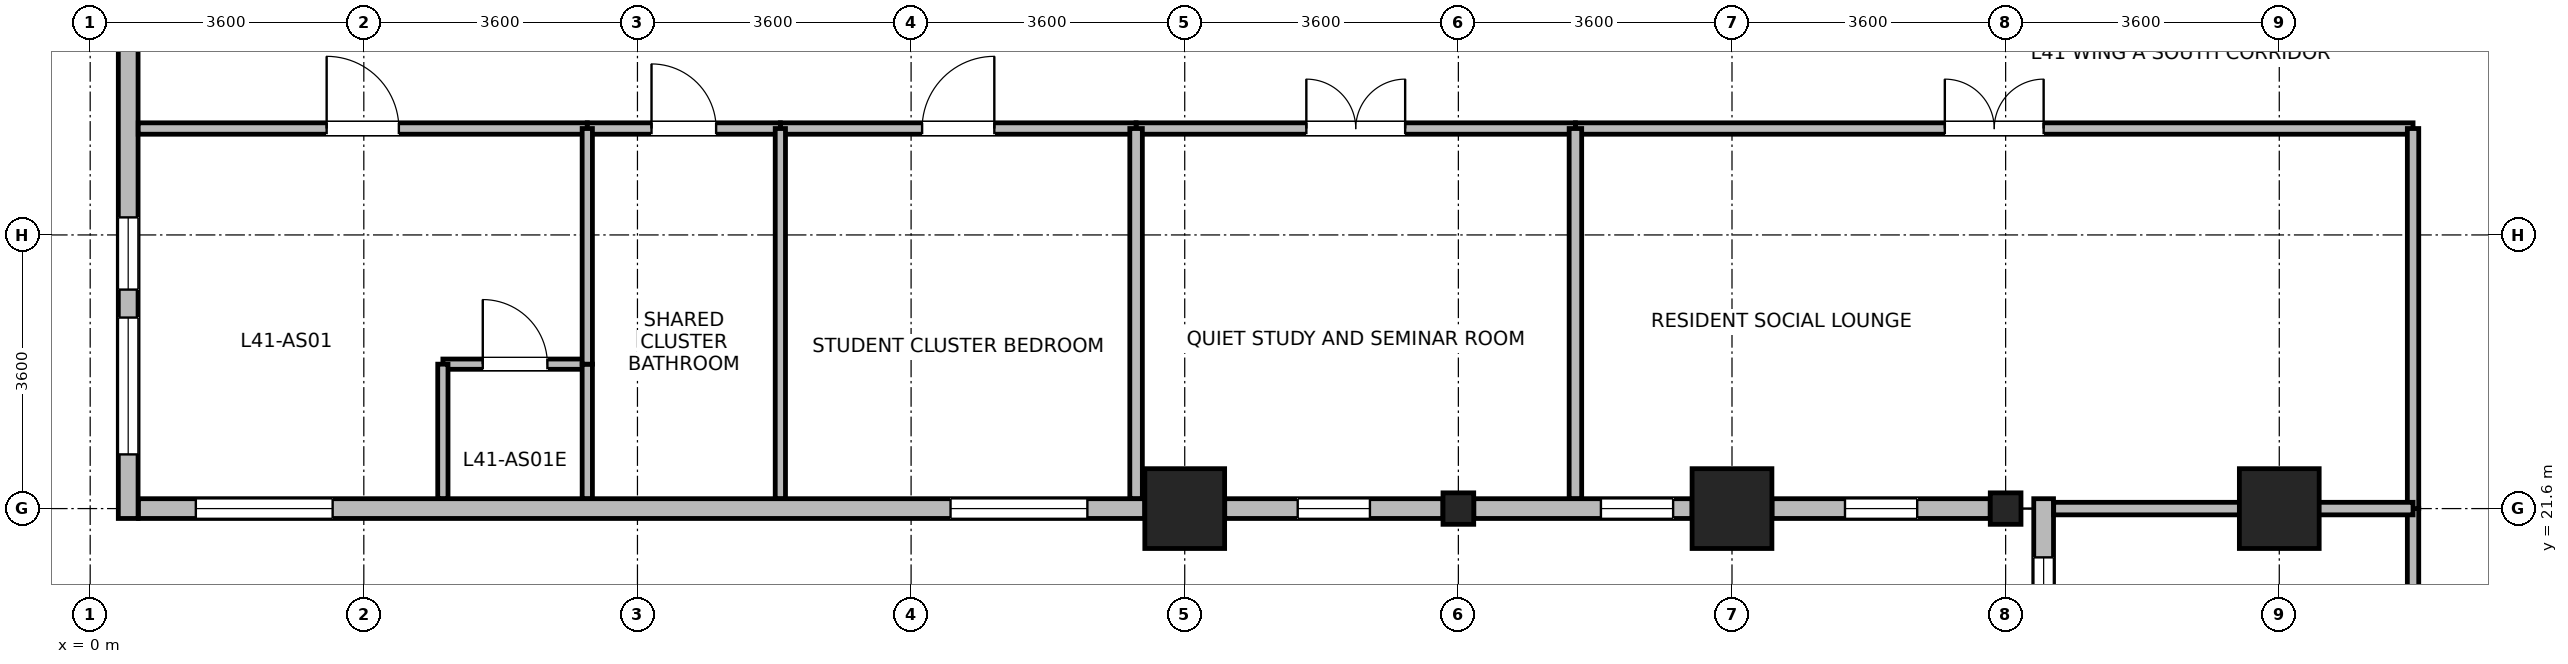
"""IFC4 building model, lengths in metres.
Left out: names, types, materials, properties, quantities, classifications, styles, units other than length and angle.
Written with IfcOpenShell. Run it as: python <this file> out.ifc"""

import sys

from ifc_helpers import new_model, si_unit, direction, frame, frame_2d, origin, origin_2d, place, context, subcontext, project, spatial, rectangle, i_section, extrude, source, transform, mapped, element, fill, save


model = new_model("IFC4")
c1 = context("Model", 3, precision=1e-05, world=origin(), true_north=direction((0.0, 1.0)))
c2 = subcontext(c1, "Body", "Model", "MODEL_VIEW")
j1 = project(units=[si_unit("LENGTHUNIT", "METRE"), si_unit("PLANEANGLEUNIT", "RADIAN")], contexts=[c1])
p1 = place(None, origin())
s1 = spatial("IfcSite", under=j1, at=p1, CompositionType="ELEMENT")
p2 = place(p1, origin())
s2 = spatial("IfcBuilding", under=s1, at=p2, CompositionType="ELEMENT")
p3 = place(p2, frame((0.0, 0.0, 162.4)))
s3 = spatial("IfcBuildingStorey", under=s2, at=p3, CompositionType="ELEMENT", Elevation=162.4)
m1 = source(origin(), c2, "Body", "SweptSolid", [
    extrude(rectangle(XDim=1.05, YDim=1.05, at=origin_2d()), origin(), (0.0, 0.0, 1.0), 3.7),
])
for number, where, z_axis, x_axis in (
    (1, (14.4, 21.6, 0.0), (0.0, 0.0, 1.0), (1.0, 0.0, 0.0)),
    (2, (21.6, 21.6, 0.0), (0.0, 0.0, 1.0), (1.0, 0.0, 0.0)),
    (3, (28.8, 21.6, 0.0), (0.0, 0.0, 1.0), (1.0, 0.0, 0.0)),
):
    element("IfcColumn", number, at=place(p3, frame(where, z_axis=z_axis, x_axis=x_axis)), inside=s3, PredefinedType="COLUMN", context=c2, shape_type="MappedRepresentation", body=[
        mapped(m1, transform((0.0, 0.0, 0.0), x_axis=(1.0, 0.0, 0.0), y_axis=(0.0, 1.0, 0.0), z_axis=(0.0, 0.0, 1.0), scale=1.0)),
    ])
m2 = source(origin(), c2, "Body", "SweptSolid", [
    extrude(i_section(OverallWidth=0.404, OverallDepth=0.414, WebThickness=0.021, FlangeThickness=0.028, FilletRadius=0.015, at=origin_2d()), origin(), (0.0, 0.0, 1.0), 3.7),
])
for number, where, z_axis, x_axis in (
    (4, (18.0, 21.6, 0.0), (0.0, 0.0, 1.0), (1.0, 0.0, 0.0)),
    (5, (25.2, 21.6, 0.0), (0.0, 0.0, 1.0), (1.0, 0.0, 0.0)),
):
    element("IfcColumn", number, at=place(p3, frame(where, z_axis=z_axis, x_axis=x_axis)), inside=s3, PredefinedType="COLUMN", context=c2, shape_type="MappedRepresentation", body=[
        mapped(m2, transform((0.0, 0.0, 0.0), x_axis=(1.0, 0.0, 0.0), y_axis=(0.0, 1.0, 0.0), z_axis=(0.0, 0.0, 1.0), scale=1.0)),
    ])
p4 = place(p3, frame((0.5, 21.47, 0.0), z_axis=(0.0, 0.0, 1.0), x_axis=(0.0, 1.0, 0.0)))
e6 = element("IfcWall", 6, at=p4, inside=s3, PredefinedType="STANDARD", context=c2, shape_type="SweptSolid", body=[
    extrude(rectangle(XDim=6.972, YDim=0.26, at=frame_2d((3.486, 0.0))), origin(), (0.0, 0.0, 1.0), 3.44),
])
p5 = place(p4, frame((0.843, 0.0, 0.85)))
e7 = element("IfcOpeningElement", 7, at=p5, cuts=e6, PredefinedType="OPENING", context=c2, shape_type="SweptSolid", body=[
    extrude(rectangle(XDim=1.8, YDim=1.85, at=frame_2d((0.9, 0.925))), frame((0.0, 0.14, 0.0), z_axis=(0.0, -1.0, 0.0), x_axis=(1.0, 0.0, 0.0)), (0.0, 0.0, 1.0), 0.28),
])
p6 = place(p4, frame((3.011, 0.0, 0.85)))
e8 = element("IfcOpeningElement", 8, at=p6, cuts=e6, PredefinedType="OPENING", context=c2, shape_type="SweptSolid", body=[
    extrude(rectangle(XDim=0.95, YDim=1.75, at=frame_2d((0.475, 0.875))), frame((0.0, 0.14, 0.0), z_axis=(0.0, -1.0, 0.0), x_axis=(1.0, 0.0, 0.0)), (0.0, 0.0, 1.0), 0.28),
])
p7 = place(p3, frame((13.874, 21.6, 0.0), z_axis=(0.0, 0.0, 1.0), x_axis=(-1.0, 0.0, 0.0)))
e9 = element("IfcWall", 9, at=p7, inside=s3, PredefinedType="STANDARD", context=c2, shape_type="SweptSolid", body=[
    extrude(rectangle(XDim=13.239, YDim=0.26, at=frame_2d((6.62, 0.0))), origin(), (0.0, 0.0, 1.0), 3.44),
])
p8 = place(p7, frame((0.755, 0.0, 0.85)))
e10 = element("IfcOpeningElement", 10, at=p8, cuts=e9, PredefinedType="OPENING", context=c2, shape_type="SweptSolid", body=[
    extrude(rectangle(XDim=1.8, YDim=1.85, at=frame_2d((0.9, 0.925))), frame((0.0, 0.14, 0.0), z_axis=(0.0, -1.0, 0.0), x_axis=(1.0, 0.0, 0.0)), (0.0, 0.0, 1.0), 0.28),
])
p9 = place(p7, frame((10.684, 0.0, 0.85)))
e11 = element("IfcOpeningElement", 11, at=p9, cuts=e9, PredefinedType="OPENING", context=c2, shape_type="SweptSolid", body=[
    extrude(rectangle(XDim=1.8, YDim=1.85, at=frame_2d((0.9, 0.925))), frame((0.0, 0.14, 0.0), z_axis=(0.0, -1.0, 0.0), x_axis=(1.0, 0.0, 0.0)), (0.0, 0.0, 1.0), 0.28),
])
p10 = place(p3, frame((17.797, 21.6, 0.0), z_axis=(0.0, 0.0, 1.0), x_axis=(-1.0, 0.0, 0.0)))
e12 = element("IfcWall", 12, at=p10, inside=s3, PredefinedType="STANDARD", context=c2, shape_type="SweptSolid", body=[
    extrude(rectangle(XDim=2.871, YDim=0.26, at=frame_2d((1.436, 0.0))), origin(), (0.0, 0.0, 1.0), 2.99),
])
p11 = place(p10, frame((0.96, 0.0, 0.85)))
e13 = element("IfcOpeningElement", 13, at=p11, cuts=e12, PredefinedType="OPENING", context=c2, shape_type="SweptSolid", body=[
    extrude(rectangle(XDim=0.95, YDim=1.75, at=frame_2d((0.475, 0.875))), frame((0.0, 0.14, 0.0), z_axis=(0.0, -1.0, 0.0), x_axis=(1.0, 0.0, 0.0)), (0.0, 0.0, 1.0), 0.28),
])
p12 = place(p3, frame((21.074, 21.6, 0.0), z_axis=(0.0, 0.0, 1.0), x_axis=(-1.0, 0.0, 0.0)))
e14 = element("IfcWall", 14, at=p12, inside=s3, PredefinedType="STANDARD", context=c2, shape_type="SweptSolid", body=[
    extrude(rectangle(XDim=2.871, YDim=0.26, at=frame_2d((1.436, 0.0))), origin(), (0.0, 0.0, 1.0), 2.99),
])
p13 = place(p12, frame((0.249, 0.0, 0.85)))
e15 = element("IfcOpeningElement", 15, at=p13, cuts=e14, PredefinedType="OPENING", context=c2, shape_type="SweptSolid", body=[
    extrude(rectangle(XDim=0.95, YDim=1.75, at=frame_2d((0.475, 0.875))), frame((0.0, 0.14, 0.0), z_axis=(0.0, -1.0, 0.0), x_axis=(1.0, 0.0, 0.0)), (0.0, 0.0, 1.0), 0.28),
])
p14 = place(p3, frame((24.997, 21.6, 0.0), z_axis=(0.0, 0.0, 1.0), x_axis=(-1.0, 0.0, 0.0)))
e16 = element("IfcWall", 16, at=p14, inside=s3, PredefinedType="STANDARD", context=c2, shape_type="SweptSolid", body=[
    extrude(rectangle(XDim=2.871, YDim=0.26, at=frame_2d((1.436, 0.0))), origin(), (0.0, 0.0, 1.0), 2.99),
])
p15 = place(p14, frame((0.96, 0.0, 0.85)))
e17 = element("IfcOpeningElement", 17, at=p15, cuts=e16, PredefinedType="OPENING", context=c2, shape_type="SweptSolid", body=[
    extrude(rectangle(XDim=0.95, YDim=1.75, at=frame_2d((0.475, 0.875))), frame((0.0, 0.14, 0.0), z_axis=(0.0, -1.0, 0.0), x_axis=(1.0, 0.0, 0.0)), (0.0, 0.0, 1.0), 0.28),
])
p16 = place(p3, frame((25.7, 1.67, 0.0), z_axis=(0.0, 0.0, 1.0), x_axis=(0.0, 1.0, 0.0)))
e18 = element("IfcWall", 18, at=p16, inside=s3, PredefinedType="STANDARD", context=c2, shape_type="SweptSolid", body=[
    extrude(rectangle(XDim=20.06, YDim=0.26, at=frame_2d((10.03, 0.0))), origin(), (0.0, 0.0, 1.0), 3.44),
])
p17 = place(p16, frame((0.772, 0.0, 0.85)))
e19 = element("IfcOpeningElement", 19, at=p17, cuts=e18, PredefinedType="OPENING", context=c2, shape_type="SweptSolid", body=[
    extrude(rectangle(XDim=1.8, YDim=1.85, at=frame_2d((0.9, 0.925))), frame((0.0, 0.14, 0.0), z_axis=(0.0, -1.0, 0.0), x_axis=(1.0, 0.0, 0.0)), (0.0, 0.0, 1.0), 0.28),
])
p18 = place(p16, frame((7.458, 0.0, 0.85)))
e20 = element("IfcOpeningElement", 20, at=p18, cuts=e18, PredefinedType="OPENING", context=c2, shape_type="SweptSolid", body=[
    extrude(rectangle(XDim=1.8, YDim=1.85, at=frame_2d((0.9, 0.925))), frame((0.0, 0.14, 0.0), z_axis=(0.0, -1.0, 0.0), x_axis=(1.0, 0.0, 0.0)), (0.0, 0.0, 1.0), 0.28),
])
p19 = place(p16, frame((14.145, 0.0, 0.85)))
e21 = element("IfcOpeningElement", 21, at=p19, cuts=e18, PredefinedType="OPENING", context=c2, shape_type="SweptSolid", body=[
    extrude(rectangle(XDim=1.8, YDim=1.85, at=frame_2d((0.9, 0.925))), frame((0.0, 0.14, 0.0), z_axis=(0.0, -1.0, 0.0), x_axis=(1.0, 0.0, 0.0)), (0.0, 0.0, 1.0), 0.28),
])
p20 = place(p16, frame((17.488, 0.0, 0.85)))
e22 = element("IfcOpeningElement", 22, at=p20, cuts=e18, PredefinedType="OPENING", context=c2, shape_type="SweptSolid", body=[
    extrude(rectangle(XDim=1.8, YDim=1.85, at=frame_2d((0.9, 0.925))), frame((0.0, 0.14, 0.0), z_axis=(0.0, -1.0, 0.0), x_axis=(1.0, 0.0, 0.0)), (0.0, 0.0, 1.0), 0.28),
])
p21 = place(p3, frame((4.64, 23.5, 0.0), z_axis=(0.0, 0.0, 1.0), x_axis=(1.0, 0.0, 0.0)))
e23 = element("IfcWall", 23, at=p21, inside=s3, PredefinedType="PARTITIONING", context=c2, shape_type="SweptSolid", body=[
    extrude(rectangle(XDim=1.9, YDim=0.135, at=frame_2d((0.95, 0.0))), origin(), (0.0, 0.0, 1.0), 3.44),
])
p22 = place(p21, frame((0.525, 0.0, 0.0)))
e24 = element("IfcOpeningElement", 24, at=p22, cuts=e23, PredefinedType="OPENING", context=c2, shape_type="SweptSolid", body=[
    extrude(rectangle(XDim=0.85, YDim=2.04, at=frame_2d((0.425, 1.02))), frame((0.0, 0.078, 0.0), z_axis=(0.0, -1.0, 0.0), x_axis=(1.0, 0.0, 0.0)), (0.0, 0.0, 1.0), 0.155),
])
for number, where, z_axis, x_axis in (
    (25, (4.64, 21.732, 0.0), (0.0, 0.0, 1.0), (0.0, 1.0, 0.0)),
    (26, (6.54, 21.732, 0.0), (0.0, 0.0, 1.0), (0.0, 1.0, 0.0)),
):
    element("IfcWall", number, at=place(p3, frame(where, z_axis=z_axis, x_axis=x_axis)), inside=s3, PredefinedType="PARTITIONING", context=c2, shape_type="SweptSolid", body=[
        extrude(rectangle(XDim=1.768, YDim=0.135, at=frame_2d((0.884, 0.0))), origin(), (0.0, 0.0, 1.0), 3.44),
    ])
p23 = place(p3, frame((19.54, 26.6, 0.0), z_axis=(0.0, 0.0, 1.0), x_axis=(1.0, 0.0, 0.0)))
e27 = element("IfcWall", 27, at=p23, inside=s3, PredefinedType="PARTITIONING", context=c2, shape_type="SweptSolid", body=[
    extrude(rectangle(XDim=11.02, YDim=0.15, at=frame_2d((5.51, 0.0))), origin(), (0.0, 0.0, 1.0), 3.44),
])
p24 = place(p23, frame((4.86, 0.0, 0.0)))
e28 = element("IfcOpeningElement", 28, at=p24, cuts=e27, PredefinedType="OPENING", context=c2, shape_type="SweptSolid", body=[
    extrude(rectangle(XDim=1.3, YDim=2.12, at=frame_2d((0.65, 1.06))), frame((0.0, 0.085, 0.0), z_axis=(0.0, -1.0, 0.0), x_axis=(1.0, 0.0, 0.0)), (0.0, 0.0, 1.0), 0.17),
])
p25 = place(p3, frame((30.56, 14.5, 0.0), z_axis=(0.0, 0.0, 1.0), x_axis=(0.0, 1.0, 0.0)))
e29 = element("IfcWall", 29, at=p25, inside=s3, PredefinedType="PARTITIONING", context=c2, shape_type="SweptSolid", body=[
    extrude(rectangle(XDim=7.1, YDim=0.15, at=frame_2d((3.55, 0.0))), origin(), (0.0, 0.0, 1.0), 3.44),
])
p26 = place(p25, frame((2.9, 0.0, 0.0)))
e30 = element("IfcOpeningElement", 30, at=p26, cuts=e29, PredefinedType="OPENING", context=c2, shape_type="SweptSolid", body=[
    extrude(rectangle(XDim=1.3, YDim=2.12, at=frame_2d((0.65, 1.06))), frame((0.0, 0.085, 0.0), z_axis=(0.0, -1.0, 0.0), x_axis=(1.0, 0.0, 0.0)), (0.0, 0.0, 1.0), 0.17),
])
p27 = place(p3, frame((0.632, 26.6, 0.0), z_axis=(0.0, 0.0, 1.0), x_axis=(1.0, 0.0, 0.0)))
e31 = element("IfcWall", 31, at=p27, inside=s3, PredefinedType="PARTITIONING", context=c2, shape_type="SweptSolid", body=[
    extrude(rectangle(XDim=5.908, YDim=0.15, at=frame_2d((2.954, 0.0))), origin(), (0.0, 0.0, 1.0), 3.44),
])
p28 = place(p27, frame((2.479, 0.0, 0.0)))
e32 = element("IfcOpeningElement", 32, at=p28, cuts=e31, PredefinedType="OPENING", context=c2, shape_type="SweptSolid", body=[
    extrude(rectangle(XDim=0.95, YDim=2.1, at=frame_2d((0.475, 1.05))), frame((0.0, 0.085, 0.0), z_axis=(0.0, -1.0, 0.0), x_axis=(1.0, 0.0, 0.0)), (0.0, 0.0, 1.0), 0.17),
])
p29 = place(p3, frame((13.76, 26.6, 0.0), z_axis=(0.0, 0.0, 1.0), x_axis=(1.0, 0.0, 0.0)))
e33 = element("IfcWall", 33, at=p29, inside=s3, PredefinedType="PARTITIONING", context=c2, shape_type="SweptSolid", body=[
    extrude(rectangle(XDim=5.78, YDim=0.15, at=frame_2d((2.89, 0.0))), origin(), (0.0, 0.0, 1.0), 3.44),
])
p30 = place(p29, frame((2.24, 0.0, 0.0)))
e34 = element("IfcOpeningElement", 34, at=p30, cuts=e33, PredefinedType="OPENING", context=c2, shape_type="SweptSolid", body=[
    extrude(rectangle(XDim=1.3, YDim=2.12, at=frame_2d((0.65, 1.06))), frame((0.0, 0.085, 0.0), z_axis=(0.0, -1.0, 0.0), x_axis=(1.0, 0.0, 0.0)), (0.0, 0.0, 1.0), 0.17),
])
p31 = place(p3, frame((30.56, 21.6, 0.0), z_axis=(0.0, 0.0, 1.0), x_axis=(0.0, 1.0, 0.0)))
e35 = element("IfcWall", 35, at=p31, inside=s3, PredefinedType="PARTITIONING", context=c2, shape_type="SweptSolid", body=[
    extrude(rectangle(XDim=5.0, YDim=0.15, at=frame_2d((2.5, 0.0))), origin(), (0.0, 0.0, 1.0), 3.44),
])
p32 = place(p3, frame((9.08, 26.6, 0.0), z_axis=(0.0, 0.0, 1.0), x_axis=(1.0, 0.0, 0.0)))
e36 = element("IfcWall", 36, at=p32, inside=s3, PredefinedType="PARTITIONING", context=c2, shape_type="SweptSolid", body=[
    extrude(rectangle(XDim=4.68, YDim=0.15, at=frame_2d((2.34, 0.0))), origin(), (0.0, 0.0, 1.0), 3.44),
])
p33 = place(p32, frame((1.865, 0.0, 0.0)))
e37 = element("IfcOpeningElement", 37, at=p33, cuts=e36, PredefinedType="OPENING", context=c2, shape_type="SweptSolid", body=[
    extrude(rectangle(XDim=0.95, YDim=2.1, at=frame_2d((0.475, 1.05))), frame((0.0, 0.085, 0.0), z_axis=(0.0, -1.0, 0.0), x_axis=(1.0, 0.0, 0.0)), (0.0, 0.0, 1.0), 0.17),
])
p34 = place(p3, frame((6.54, 26.6, 0.0), z_axis=(0.0, 0.0, 1.0), x_axis=(1.0, 0.0, 0.0)))
e38 = element("IfcWall", 38, at=p34, inside=s3, PredefinedType="PARTITIONING", context=c2, shape_type="SweptSolid", body=[
    extrude(rectangle(XDim=2.54, YDim=0.15, at=frame_2d((1.27, 0.0))), origin(), (0.0, 0.0, 1.0), 3.44),
])
p35 = place(p34, frame((0.845, 0.0, 0.0)))
e39 = element("IfcOpeningElement", 39, at=p35, cuts=e38, PredefinedType="OPENING", context=c2, shape_type="SweptSolid", body=[
    extrude(rectangle(XDim=0.85, YDim=2.04, at=frame_2d((0.425, 1.02))), frame((0.0, 0.085, 0.0), z_axis=(0.0, -1.0, 0.0), x_axis=(1.0, 0.0, 0.0)), (0.0, 0.0, 1.0), 0.17),
])
p36 = place(p3, frame((9.08, 21.732, 0.0), z_axis=(0.0, 0.0, 1.0), x_axis=(0.0, 1.0, 0.0)))
e40 = element("IfcWall", 40, at=p36, inside=s3, PredefinedType="PARTITIONING", context=c2, shape_type="SweptSolid", body=[
    extrude(rectangle(XDim=4.868, YDim=0.135, at=frame_2d((2.434, 0.0))), origin(), (0.0, 0.0, 1.0), 3.44),
])
for number, where, z_axis, x_axis in (
    (41, (13.76, 21.732, 0.0), (0.0, 0.0, 1.0), (0.0, 1.0, 0.0)),
    (42, (19.54, 21.732, 0.0), (0.0, 0.0, 1.0), (0.0, 1.0, 0.0)),
):
    element("IfcWall", number, at=place(p3, frame(where, z_axis=z_axis, x_axis=x_axis)), inside=s3, PredefinedType="PARTITIONING", context=c2, shape_type="SweptSolid", body=[
        extrude(rectangle(XDim=4.868, YDim=0.165, at=frame_2d((2.434, 0.0))), origin(), (0.0, 0.0, 1.0), 3.44),
    ])
p37 = place(p3, frame((25.832, 21.6, 0.0), z_axis=(0.0, 0.0, 1.0), x_axis=(1.0, 0.0, 0.0)))
e43 = element("IfcWall", 43, at=p37, inside=s3, PredefinedType="PARTITIONING", context=c2, shape_type="SweptSolid", body=[
    extrude(rectangle(XDim=4.728, YDim=0.165, at=frame_2d((2.364, 0.0))), origin(), (0.0, 0.0, 1.0), 2.99),
])
p38 = place(p3, frame((6.54, 23.5, 0.0), z_axis=(0.0, 0.0, 1.0), x_axis=(0.0, 1.0, 0.0)))
e44 = element("IfcWall", 44, at=p38, inside=s3, PredefinedType="PARTITIONING", context=c2, shape_type="SweptSolid", body=[
    extrude(rectangle(XDim=3.1, YDim=0.135, at=frame_2d((1.55, 0.0))), origin(), (0.0, 0.0, 1.0), 3.44),
])
p39 = place(p5, origin())
e45 = element("IfcWindow", 45, at=p39, inside=s3, PartitioningType="SINGLE_PANEL", PredefinedType="WINDOW", context=c2, shape_type="SweptSolid", body=[
    extrude(rectangle(XDim=1.8, YDim=1.85, at=frame_2d((0.9, 0.925))), frame((0.0, 0.03, 0.0), z_axis=(0.0, -1.0, 0.0), x_axis=(1.0, 0.0, 0.0)), (0.0, 0.0, 1.0), 0.06),
])
fill(e7, e45)
p40 = place(p6, origin())
e46 = element("IfcWindow", 46, at=p40, inside=s3, PartitioningType="SINGLE_PANEL", PredefinedType="WINDOW", context=c2, shape_type="SweptSolid", body=[
    extrude(rectangle(XDim=0.95, YDim=1.75, at=frame_2d((0.475, 0.875))), frame((0.0, 0.03, 0.0), z_axis=(0.0, -1.0, 0.0), x_axis=(1.0, 0.0, 0.0)), (0.0, 0.0, 1.0), 0.06),
])
fill(e8, e46)
p41 = place(p8, origin())
e47 = element("IfcWindow", 47, at=p41, inside=s3, PartitioningType="SINGLE_PANEL", PredefinedType="WINDOW", context=c2, shape_type="SweptSolid", body=[
    extrude(rectangle(XDim=1.8, YDim=1.85, at=frame_2d((0.9, 0.925))), frame((0.0, 0.03, 0.0), z_axis=(0.0, -1.0, 0.0), x_axis=(1.0, 0.0, 0.0)), (0.0, 0.0, 1.0), 0.06),
])
fill(e10, e47)
p42 = place(p9, origin())
e48 = element("IfcWindow", 48, at=p42, inside=s3, PartitioningType="SINGLE_PANEL", PredefinedType="WINDOW", context=c2, shape_type="SweptSolid", body=[
    extrude(rectangle(XDim=1.8, YDim=1.85, at=frame_2d((0.9, 0.925))), frame((0.0, 0.03, 0.0), z_axis=(0.0, -1.0, 0.0), x_axis=(1.0, 0.0, 0.0)), (0.0, 0.0, 1.0), 0.06),
])
fill(e11, e48)
p43 = place(p11, origin())
e49 = element("IfcWindow", 49, at=p43, inside=s3, PartitioningType="SINGLE_PANEL", PredefinedType="WINDOW", context=c2, shape_type="SweptSolid", body=[
    extrude(rectangle(XDim=0.95, YDim=1.75, at=frame_2d((0.475, 0.875))), frame((0.0, 0.03, 0.0), z_axis=(0.0, -1.0, 0.0), x_axis=(1.0, 0.0, 0.0)), (0.0, 0.0, 1.0), 0.06),
])
fill(e13, e49)
p44 = place(p13, origin())
e50 = element("IfcWindow", 50, at=p44, inside=s3, PartitioningType="SINGLE_PANEL", PredefinedType="WINDOW", context=c2, shape_type="SweptSolid", body=[
    extrude(rectangle(XDim=0.95, YDim=1.75, at=frame_2d((0.475, 0.875))), frame((0.0, 0.03, 0.0), z_axis=(0.0, -1.0, 0.0), x_axis=(1.0, 0.0, 0.0)), (0.0, 0.0, 1.0), 0.06),
])
fill(e15, e50)
p45 = place(p15, origin())
e51 = element("IfcWindow", 51, at=p45, inside=s3, PartitioningType="SINGLE_PANEL", PredefinedType="WINDOW", context=c2, shape_type="SweptSolid", body=[
    extrude(rectangle(XDim=0.95, YDim=1.75, at=frame_2d((0.475, 0.875))), frame((0.0, 0.03, 0.0), z_axis=(0.0, -1.0, 0.0), x_axis=(1.0, 0.0, 0.0)), (0.0, 0.0, 1.0), 0.06),
])
fill(e17, e51)
p46 = place(p20, origin())
e52 = element("IfcWindow", 52, at=p46, inside=s3, PartitioningType="SINGLE_PANEL", PredefinedType="WINDOW", context=c2, shape_type="SweptSolid", body=[
    extrude(rectangle(XDim=1.8, YDim=1.85, at=frame_2d((0.9, 0.925))), frame((0.0, 0.03, 0.0), z_axis=(0.0, -1.0, 0.0), x_axis=(1.0, 0.0, 0.0)), (0.0, 0.0, 1.0), 0.06),
])
fill(e22, e52)
p47 = place(p22, origin())
e53 = element("IfcDoor", 53, at=p47, inside=s3, OperationType="SINGLE_SWING_LEFT", PredefinedType="DOOR", context=c2, shape_type="SweptSolid", body=[
    extrude(rectangle(XDim=0.85, YDim=2.04, at=frame_2d((0.425, 1.02))), frame((0.0, 0.025, 0.0), z_axis=(0.0, -1.0, 0.0), x_axis=(1.0, 0.0, 0.0)), (0.0, 0.0, 1.0), 0.05),
])
fill(e24, e53)
p48 = place(p24, origin())
e54 = element("IfcDoor", 54, at=p48, inside=s3, OperationType="DOUBLE_DOOR_SINGLE_SWING", PredefinedType="DOOR", context=c2, shape_type="SweptSolid", body=[
    extrude(rectangle(XDim=1.3, YDim=2.12, at=frame_2d((0.65, 1.06))), frame((0.0, 0.025, 0.0), z_axis=(0.0, -1.0, 0.0), x_axis=(1.0, 0.0, 0.0)), (0.0, 0.0, 1.0), 0.05),
])
fill(e28, e54)
p49 = place(p28, origin())
e55 = element("IfcDoor", 55, at=p49, inside=s3, OperationType="SINGLE_SWING_LEFT", PredefinedType="DOOR", context=c2, shape_type="SweptSolid", body=[
    extrude(rectangle(XDim=0.95, YDim=2.1, at=frame_2d((0.475, 1.05))), frame((0.0, 0.025, 0.0), z_axis=(0.0, -1.0, 0.0), x_axis=(1.0, 0.0, 0.0)), (0.0, 0.0, 1.0), 0.05),
])
fill(e32, e55)
p50 = place(p30, origin())
e56 = element("IfcDoor", 56, at=p50, inside=s3, OperationType="DOUBLE_DOOR_SINGLE_SWING", PredefinedType="DOOR", context=c2, shape_type="SweptSolid", body=[
    extrude(rectangle(XDim=1.3, YDim=2.12, at=frame_2d((0.65, 1.06))), frame((0.0, 0.025, 0.0), z_axis=(0.0, -1.0, 0.0), x_axis=(1.0, 0.0, 0.0)), (0.0, 0.0, 1.0), 0.05),
])
fill(e34, e56)
p51 = place(p33, origin())
e57 = element("IfcDoor", 57, at=p51, inside=s3, OperationType="SINGLE_SWING_RIGHT", PredefinedType="DOOR", context=c2, shape_type="SweptSolid", body=[
    extrude(rectangle(XDim=0.95, YDim=2.1, at=frame_2d((0.475, 1.05))), frame((0.0, 0.025, 0.0), z_axis=(0.0, -1.0, 0.0), x_axis=(1.0, 0.0, 0.0)), (0.0, 0.0, 1.0), 0.05),
])
fill(e37, e57)
p52 = place(p35, origin())
e58 = element("IfcDoor", 58, at=p52, inside=s3, OperationType="SINGLE_SWING_LEFT", PredefinedType="DOOR", context=c2, shape_type="SweptSolid", body=[
    extrude(rectangle(XDim=0.85, YDim=2.04, at=frame_2d((0.425, 1.02))), frame((0.0, 0.025, 0.0), z_axis=(0.0, -1.0, 0.0), x_axis=(1.0, 0.0, 0.0)), (0.0, 0.0, 1.0), 0.05),
])
fill(e39, e58)
save(model, sys.argv[1])
